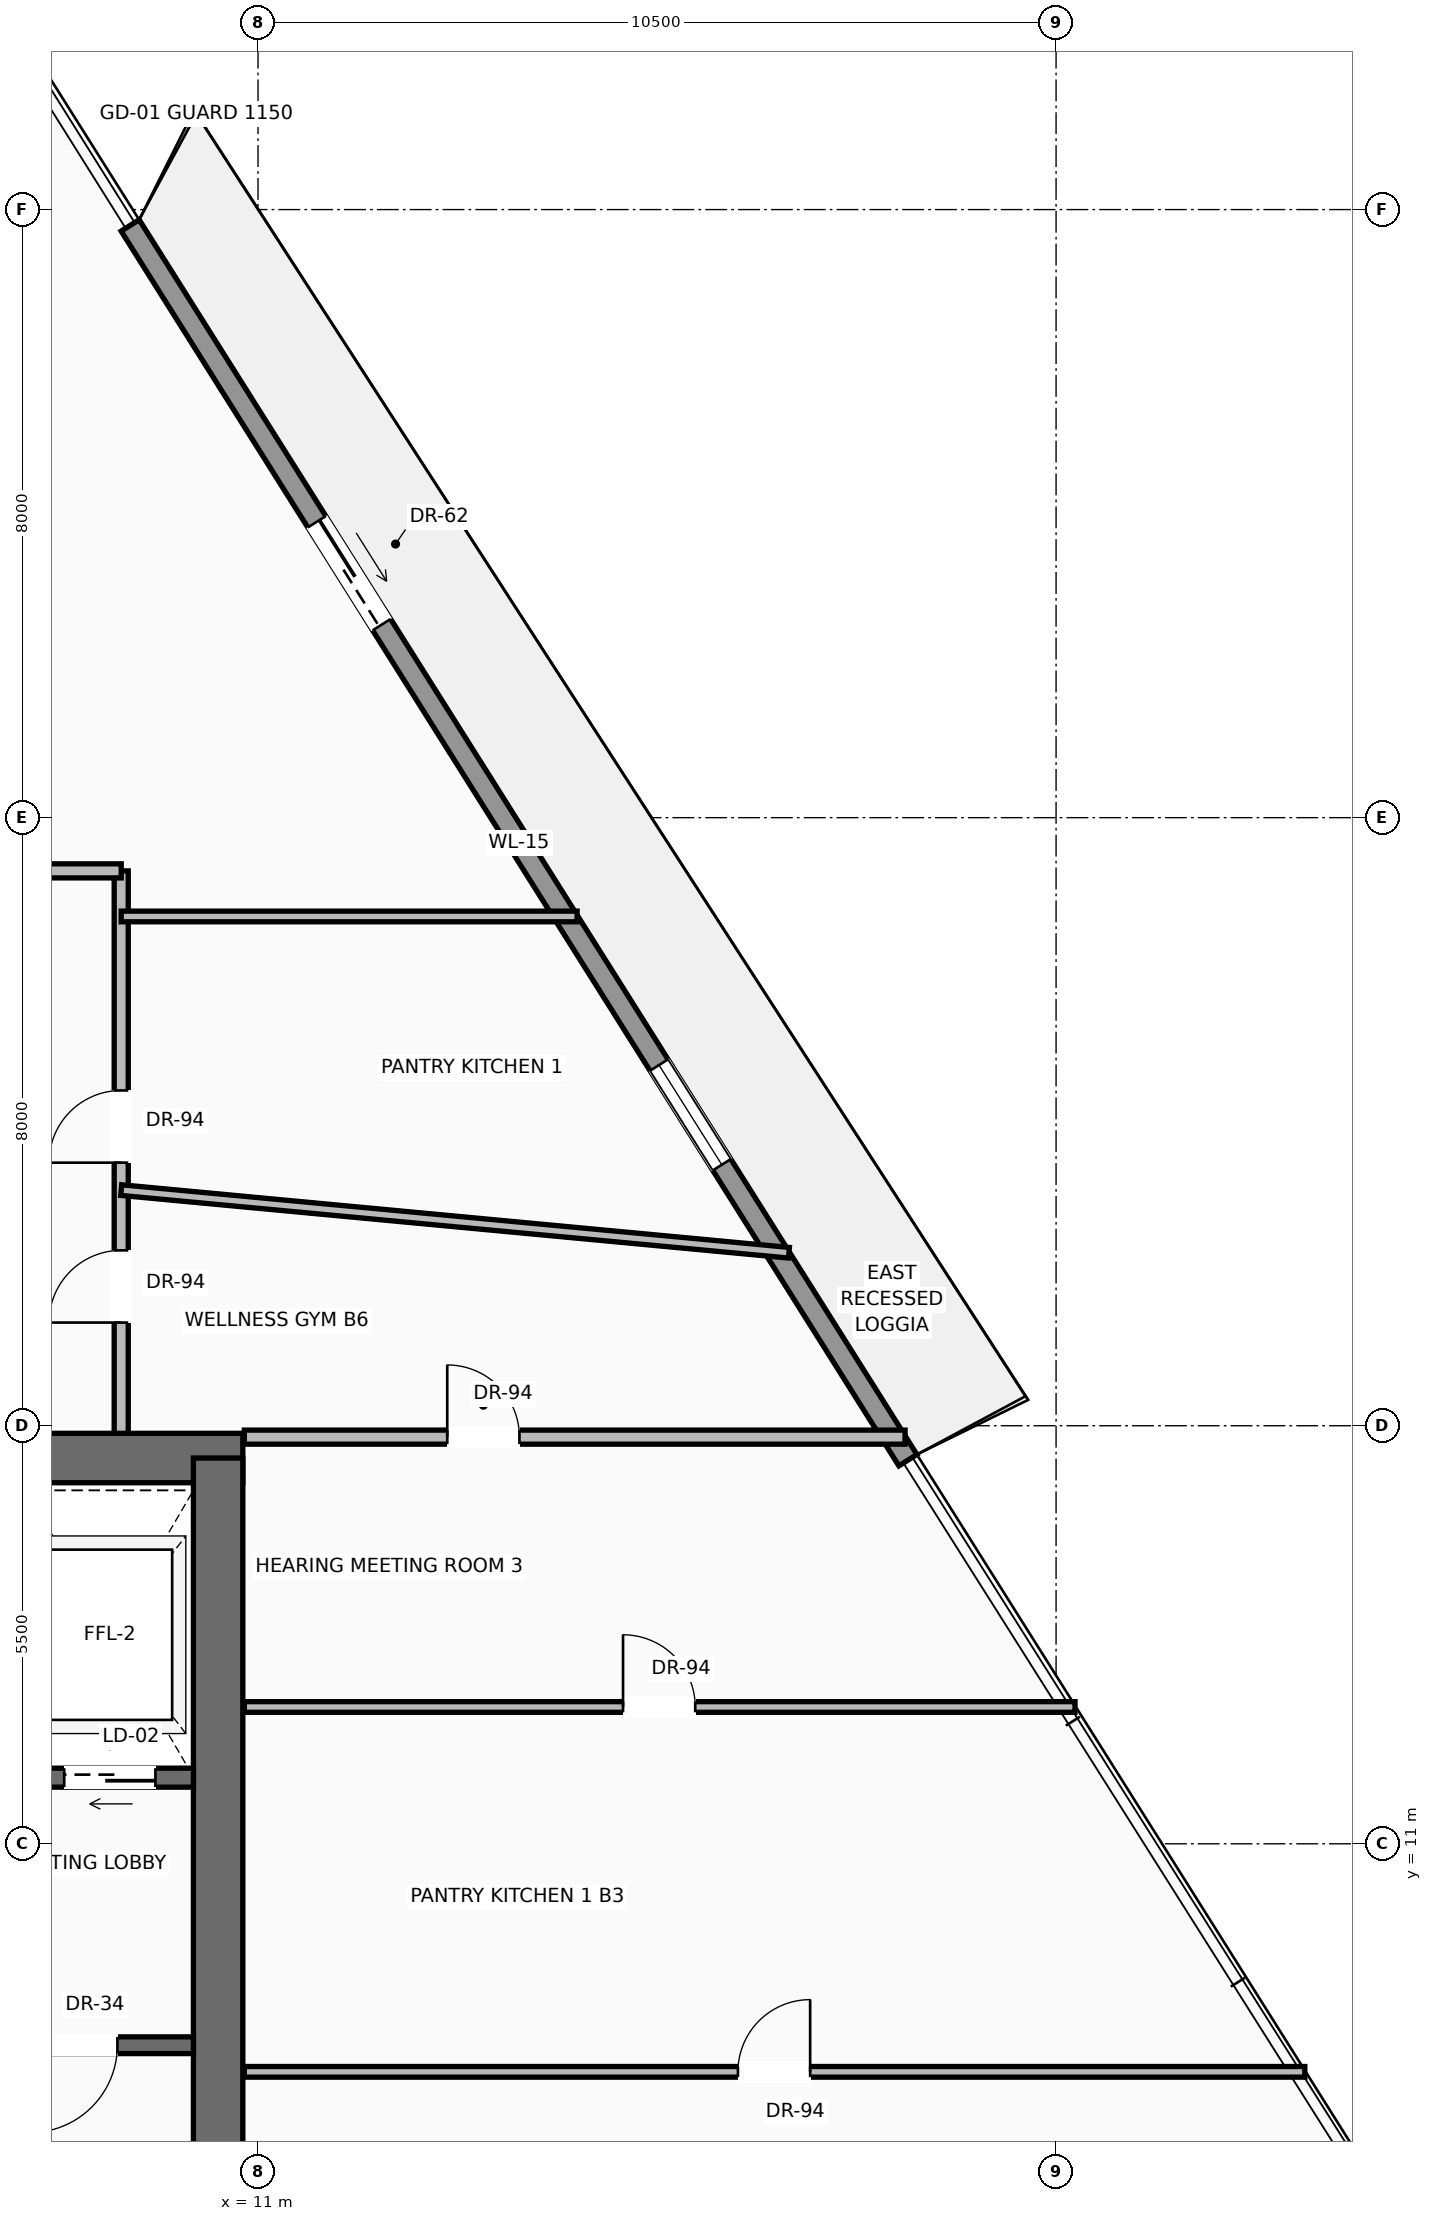
"""IFC4 building model, lengths in metres.
Left out: names, types, materials, properties, quantities, classifications, styles, units other than length and angle.
Written with IfcOpenShell. Run it as: python <this file> out.ifc"""

import sys

from ifc_helpers import new_model, si_unit, direction, frame, frame_2d, origin, place, context, subcontext, project, spatial, rectangle, extrude, source, transform, mapped, element, fill, save


model = new_model("IFC4")
c1 = context("Model", 3, precision=1e-05, world=origin(), true_north=direction((0.0, 1.0)))
c2 = subcontext(c1, "Body", "Model", "MODEL_VIEW")
j1 = project(units=[si_unit("LENGTHUNIT", "METRE"), si_unit("PLANEANGLEUNIT", "RADIAN")], contexts=[c1])
p1 = place(None, origin())
s1 = spatial("IfcSite", under=j1, at=p1, CompositionType="ELEMENT")
p2 = place(p1, origin())
s2 = spatial("IfcBuilding", under=s1, at=p2, CompositionType="ELEMENT")
p3 = place(p2, frame((0.0, 0.0, 208.0)))
s3 = spatial("IfcBuildingStorey", under=s2, at=p3, CompositionType="ELEMENT", Elevation=208.0)
p4 = place(p3, frame((-10.8, 16.075, 0.0), z_axis=(0.0, 0.0, 1.0), x_axis=(1.0, 0.0, 0.0)))
e1 = element("IfcWall", 1, at=p4, inside=s3, PredefinedType="SHEAR", context=c2, shape_type="SweptSolid", body=[
    extrude(rectangle(XDim=21.6, YDim=0.65, at=frame_2d((10.8, 0.0))), origin(), (0.0, 0.0, 1.0), 3.47),
])
p5 = place(p4, frame((3.37, 0.0, 0.0)))
e2 = element("IfcOpeningElement", 2, at=p5, cuts=e1, PredefinedType="OPENING", context=c2, shape_type="SweptSolid", body=[
    extrude(rectangle(XDim=1.3, YDim=2.3, at=frame_2d((0.65, 1.15))), frame((0.0, 0.335, 0.0), z_axis=(0.0, -1.0, 0.0), x_axis=(1.0, 0.0, 0.0)), (0.0, 0.0, 1.0), 0.67),
])
p6 = place(p4, frame((9.8, 0.0, 0.0)))
e3 = element("IfcOpeningElement", 3, at=p6, cuts=e1, PredefinedType="OPENING", context=c2, shape_type="SweptSolid", body=[
    extrude(rectangle(XDim=2.0, YDim=2.4, at=frame_2d((1.0, 1.2))), frame((0.0, 0.335, 0.0), z_axis=(0.0, -1.0, 0.0), x_axis=(1.0, 0.0, 0.0)), (0.0, 0.0, 1.0), 0.67),
])
p7 = place(p3, frame((10.475, 0.525, 0.0), z_axis=(0.0, 0.0, 1.0), x_axis=(0.0, 1.0, 0.0)))
e4 = element("IfcWall", 4, at=p7, inside=s3, PredefinedType="SHEAR", context=c2, shape_type="SweptSolid", body=[
    extrude(rectangle(XDim=15.55, YDim=0.65, at=frame_2d((7.775, 0.0))), origin(), (0.0, 0.0, 1.0), 3.47),
])
p8 = place(p3, frame((9.318, 32.292, 0.0), z_axis=(0.0, 0.0, 1.0), x_axis=(0.532974477416, -0.846131317482, 0.0)))
e5 = element("IfcWall", 5, at=p8, inside=s3, PredefinedType="SOLIDWALL", context=c2, shape_type="SweptSolid", body=[
    extrude(rectangle(XDim=19.199, YDim=0.28, at=frame_2d((9.599, 0.0))), origin(), (0.0, 0.0, 1.0), 3.05),
])
p9 = place(p8, frame((4.608, 0.0, 0.0)))
e6 = element("IfcOpeningElement", 6, at=p9, cuts=e5, PredefinedType="OPENING", context=c2, shape_type="SweptSolid", body=[
    extrude(rectangle(XDim=1.6, YDim=2.35, at=frame_2d((0.8, 1.175))), frame((0.0, 0.15, 0.0), z_axis=(0.0, -1.0, 0.0), x_axis=(1.0, 0.0, 0.0)), (0.0, 0.0, 1.0), 0.3),
])
p10 = place(p8, frame((13.055, 0.0, 0.9)))
e7 = element("IfcOpeningElement", 7, at=p10, cuts=e5, PredefinedType="OPENING", context=c2, shape_type="SweptSolid", body=[
    extrude(rectangle(XDim=1.55, YDim=1.85, at=frame_2d((0.775, 0.925))), frame((0.0, 0.15, 0.0), z_axis=(0.0, -1.0, 0.0), x_axis=(1.0, 0.0, 0.0)), (0.0, 0.0, 1.0), 0.3),
])
p11 = place(p3, frame((10.15, 8.35, 0.0), z_axis=(0.0, 0.0, 1.0), x_axis=(-1.0, 0.0, 0.0)))
e8 = element("IfcWall", 8, at=p11, inside=s3, PredefinedType="SOLIDWALL", context=c2, shape_type="SweptSolid", body=[
    extrude(rectangle(XDim=4.65, YDim=0.22, at=frame_2d((2.325, 0.0))), origin(), (0.0, 0.0, 1.0), 3.47),
])
p12 = place(p11, frame((1.0, 0.0, 0.0)))
e9 = element("IfcOpeningElement", 9, at=p12, cuts=e8, PredefinedType="OPENING", context=c2, shape_type="SweptSolid", body=[
    extrude(rectangle(XDim=1.15, YDim=2.2, at=frame_2d((0.575, 1.1))), frame((0.0, 0.12, 0.0), z_axis=(0.0, -1.0, 0.0), x_axis=(1.0, 0.0, 0.0)), (0.0, 0.0, 1.0), 0.24),
])
p13 = place(p3, frame((10.15, 11.87, 0.0), z_axis=(0.0, 0.0, 1.0), x_axis=(-1.0, 0.0, 0.0)))
e10 = element("IfcWall", 10, at=p13, inside=s3, PredefinedType="SOLIDWALL", context=c2, shape_type="SweptSolid", body=[
    extrude(rectangle(XDim=4.65, YDim=0.25, at=frame_2d((2.325, 0.0))), origin(), (0.0, 0.0, 1.0), 3.47),
])
p14 = place(p13, frame((0.5, 0.0, 0.0)))
e11 = element("IfcOpeningElement", 11, at=p14, cuts=e10, PredefinedType="OPENING", context=c2, shape_type="SweptSolid", body=[
    extrude(rectangle(XDim=1.2, YDim=2.25, at=frame_2d((0.6, 1.125))), frame((0.0, 0.135, 0.0), z_axis=(0.0, -1.0, 0.0), x_axis=(1.0, 0.0, 0.0)), (0.0, 0.0, 1.0), 0.27),
])
p15 = place(p3, frame((9.2, 16.4, 0.0), z_axis=(0.0, 0.0, 1.0), x_axis=(0.0, 1.0, 0.0)))
e12 = element("IfcWall", 12, at=p15, inside=s3, PredefinedType="PARTITIONING", context=c2, shape_type="SweptSolid", body=[
    extrude(rectangle(XDim=7.4, YDim=0.185, at=frame_2d((3.7, 0.0))), origin(), (0.0, 0.0, 1.0), 3.462),
])
p16 = place(p15, frame((3.561, 0.0, 0.0)))
e13 = element("IfcOpeningElement", 13, at=p16, cuts=e12, PredefinedType="OPENING", context=c2, shape_type="SweptSolid", body=[
    extrude(rectangle(XDim=0.95, YDim=2.2, at=frame_2d((0.475, 1.1))), frame((0.0, 0.103, 0.0), z_axis=(0.0, -1.0, 0.0), x_axis=(1.0, 0.0, 0.0)), (0.0, 0.0, 1.0), 0.205),
])
p17 = place(p15, frame((1.457, 0.0, 0.0)))
e14 = element("IfcOpeningElement", 14, at=p17, cuts=e12, PredefinedType="OPENING", context=c2, shape_type="SweptSolid", body=[
    extrude(rectangle(XDim=0.95, YDim=2.2, at=frame_2d((0.475, 1.1))), frame((0.0, 0.103, 0.0), z_axis=(0.0, -1.0, 0.0), x_axis=(1.0, 0.0, 0.0)), (0.0, 0.0, 1.0), 0.205),
])
p18 = place(p3, frame((7.0, 23.8, 0.0), z_axis=(0.0, 0.0, 1.0), x_axis=(1.0, 0.0, 0.0)))
e15 = element("IfcWall", 15, at=p18, inside=s3, PredefinedType="PARTITIONING", context=c2, shape_type="SweptSolid", body=[
    extrude(rectangle(XDim=2.2, YDim=0.185, at=frame_2d((1.1, 0.0))), origin(), (0.0, 0.0, 1.0), 3.462),
])
p19 = place(p3, frame((10.82, 16.35, 0.0), z_axis=(0.0, 0.0, 1.0), x_axis=(1.0, 0.0, 0.0)))
e16 = element("IfcWall", 16, at=p19, inside=s3, PredefinedType="PARTITIONING", context=c2, shape_type="SweptSolid", body=[
    extrude(rectangle(XDim=8.693, YDim=0.185, at=frame_2d((4.347, 0.0))), origin(), (0.0, 0.0, 1.0), 3.462),
])
p20 = place(p19, frame((2.67, 0.0, 0.0)))
e17 = element("IfcOpeningElement", 17, at=p20, cuts=e16, PredefinedType="OPENING", context=c2, shape_type="SweptSolid", body=[
    extrude(rectangle(XDim=0.95, YDim=2.2, at=frame_2d((0.475, 1.1))), frame((0.0, 0.103, 0.0), z_axis=(0.0, -1.0, 0.0), x_axis=(1.0, 0.0, 0.0)), (0.0, 0.0, 1.0), 0.205),
])
p21 = place(p3, frame((10.82, 8.0, 0.0), z_axis=(0.0, 0.0, 1.0), x_axis=(1.0, 0.0, 0.0)))
e18 = element("IfcWall", 18, at=p21, inside=s3, PredefinedType="PARTITIONING", context=c2, shape_type="SweptSolid", body=[
    extrude(rectangle(XDim=13.953, YDim=0.14, at=frame_2d((6.976, 0.0))), origin(), (0.0, 0.0, 1.0), 3.462),
])
p22 = place(p21, frame((6.494, 0.0, 0.0)))
e19 = element("IfcOpeningElement", 19, at=p22, cuts=e18, PredefinedType="OPENING", context=c2, shape_type="SweptSolid", body=[
    extrude(rectangle(XDim=0.95, YDim=2.2, at=frame_2d((0.475, 1.1))), frame((0.0, 0.08, 0.0), z_axis=(0.0, -1.0, 0.0), x_axis=(1.0, 0.0, 0.0)), (0.0, 0.0, 1.0), 0.16),
])
p23 = place(p3, frame((10.82, 12.8, 0.0), z_axis=(0.0, 0.0, 1.0), x_axis=(1.0, 0.0, 0.0)))
e20 = element("IfcWall", 20, at=p23, inside=s3, PredefinedType="PARTITIONING", context=c2, shape_type="SweptSolid", body=[
    extrude(rectangle(XDim=10.929, YDim=0.14, at=frame_2d((5.465, 0.0))), origin(), (0.0, 0.0, 1.0), 3.462),
])
p24 = place(p23, frame((4.982, 0.0, 0.0)))
e21 = element("IfcOpeningElement", 21, at=p24, cuts=e20, PredefinedType="OPENING", context=c2, shape_type="SweptSolid", body=[
    extrude(rectangle(XDim=0.95, YDim=2.2, at=frame_2d((0.475, 1.1))), frame((0.0, 0.08, 0.0), z_axis=(0.0, -1.0, 0.0), x_axis=(1.0, 0.0, 0.0)), (0.0, 0.0, 1.0), 0.16),
])
p25 = place(p3, frame((9.2, 19.6, 0.0), z_axis=(0.0, 0.0, 1.0), x_axis=(0.995630126913, -0.093384422598, 0.0)))
e22 = element("IfcWall", 22, at=p25, inside=s3, PredefinedType="PARTITIONING", context=c2, shape_type="SweptSolid", body=[
    extrude(rectangle(XDim=8.823, YDim=0.14, at=frame_2d((4.412, 0.0))), origin(), (0.0, 0.0, 1.0), 3.049),
])
p26 = place(p3, frame((9.2, 23.2, 0.0), z_axis=(0.0, 0.0, 1.0), x_axis=(1.0, 0.0, 0.0)))
e23 = element("IfcWall", 23, at=p26, inside=s3, PredefinedType="PARTITIONING", context=c2, shape_type="SweptSolid", body=[
    extrude(rectangle(XDim=5.998, YDim=0.14, at=frame_2d((2.999, 0.0))), origin(), (0.0, 0.0, 1.0), 3.462),
])
m1 = source(origin(), c2, "Body", "SweptSolid", [
    extrude(rectangle(XDim=1.6, YDim=2.35, at=frame_2d((0.8, 1.175))), frame((0.0, 0.025, 0.0), z_axis=(0.0, -1.0, 0.0), x_axis=(1.0, 0.0, 0.0)), (0.0, 0.0, 1.0), 0.05),
])
p27 = place(p9, origin())
e24 = element("IfcDoor", 24, at=p27, inside=s3, OperationType="SLIDING_TO_RIGHT", PredefinedType="DOOR", context=c2, shape_type="MappedRepresentation", body=[
    mapped(m1, transform((0.0, 0.0, 0.0), scale=1.0)),
])
fill(e6, e24)
m2 = source(origin(), c2, "Body", "SweptSolid", [
    extrude(rectangle(XDim=1.55, YDim=1.85, at=frame_2d((0.775, 0.925))), frame((0.0, 0.03, 0.0), z_axis=(0.0, -1.0, 0.0), x_axis=(1.0, 0.0, 0.0)), (0.0, 0.0, 1.0), 0.06),
])
p28 = place(p10, origin())
e25 = element("IfcWindow", 25, at=p28, inside=s3, PartitioningType="SINGLE_PANEL", PredefinedType="WINDOW", context=c2, shape_type="MappedRepresentation", body=[
    mapped(m2, transform((0.0, 0.0, 0.0), scale=1.0)),
])
fill(e7, e25)
m3 = source(origin(), c2, "Body", "SweptSolid", [
    extrude(rectangle(XDim=1.15, YDim=2.2, at=frame_2d((0.575, 1.1))), frame((0.0, 0.025, 0.0), z_axis=(0.0, -1.0, 0.0), x_axis=(1.0, 0.0, 0.0)), (0.0, 0.0, 1.0), 0.05),
])
p29 = place(p12, origin())
e26 = element("IfcDoor", 26, at=p29, inside=s3, OperationType="SINGLE_SWING_RIGHT", PredefinedType="DOOR", context=c2, shape_type="MappedRepresentation", body=[
    mapped(m3, transform((0.0, 0.0, 0.0), scale=1.0)),
])
fill(e9, e26)
m4 = source(origin(), c2, "Body", "SweptSolid", [
    extrude(rectangle(XDim=1.2, YDim=2.25, at=frame_2d((0.6, 1.125))), frame((0.0, 0.025, 0.0), z_axis=(0.0, -1.0, 0.0), x_axis=(1.0, 0.0, 0.0)), (0.0, 0.0, 1.0), 0.05),
])
p30 = place(p14, origin())
e27 = element("IfcDoor", 27, at=p30, inside=s3, OperationType="SLIDING_TO_RIGHT", PredefinedType="DOOR", context=c2, shape_type="MappedRepresentation", body=[
    mapped(m4, transform((0.0, 0.0, 0.0), scale=1.0)),
])
fill(e11, e27)
m5 = source(origin(), c2, "Body", "SweptSolid", [
    extrude(rectangle(XDim=0.95, YDim=2.2, at=frame_2d((0.475, 1.1))), frame((0.0, 0.025, 0.0), z_axis=(0.0, -1.0, 0.0), x_axis=(1.0, 0.0, 0.0)), (0.0, 0.0, 1.0), 0.05),
])
p31 = place(p16, origin())
e28 = element("IfcDoor", 28, at=p31, inside=s3, OperationType="SINGLE_SWING_LEFT", PredefinedType="DOOR", context=c2, shape_type="MappedRepresentation", body=[
    mapped(m5, transform((0.0, 0.0, 0.0), scale=1.0)),
])
fill(e13, e28)
p32 = place(p20, origin())
e29 = element("IfcDoor", 29, at=p32, inside=s3, OperationType="SINGLE_SWING_LEFT", PredefinedType="DOOR", context=c2, shape_type="MappedRepresentation", body=[
    mapped(m5, transform((0.0, 0.0, 0.0), scale=1.0)),
])
fill(e17, e29)
p33 = place(p17, origin())
e30 = element("IfcDoor", 30, at=p33, inside=s3, OperationType="SINGLE_SWING_LEFT", PredefinedType="DOOR", context=c2, shape_type="MappedRepresentation", body=[
    mapped(m5, transform((0.0, 0.0, 0.0), scale=1.0)),
])
fill(e14, e30)
p34 = place(p24, origin())
e31 = element("IfcDoor", 31, at=p34, inside=s3, OperationType="SINGLE_SWING_LEFT", PredefinedType="DOOR", context=c2, shape_type="MappedRepresentation", body=[
    mapped(m5, transform((0.0, 0.0, 0.0), scale=1.0)),
])
fill(e21, e31)
p35 = place(p22, origin())
e32 = element("IfcDoor", 32, at=p35, inside=s3, OperationType="SINGLE_SWING_RIGHT", PredefinedType="DOOR", context=c2, shape_type="MappedRepresentation", body=[
    mapped(m5, transform((0.0, 0.0, 0.0), scale=1.0)),
])
fill(e19, e32)
save(model, sys.argv[1])
